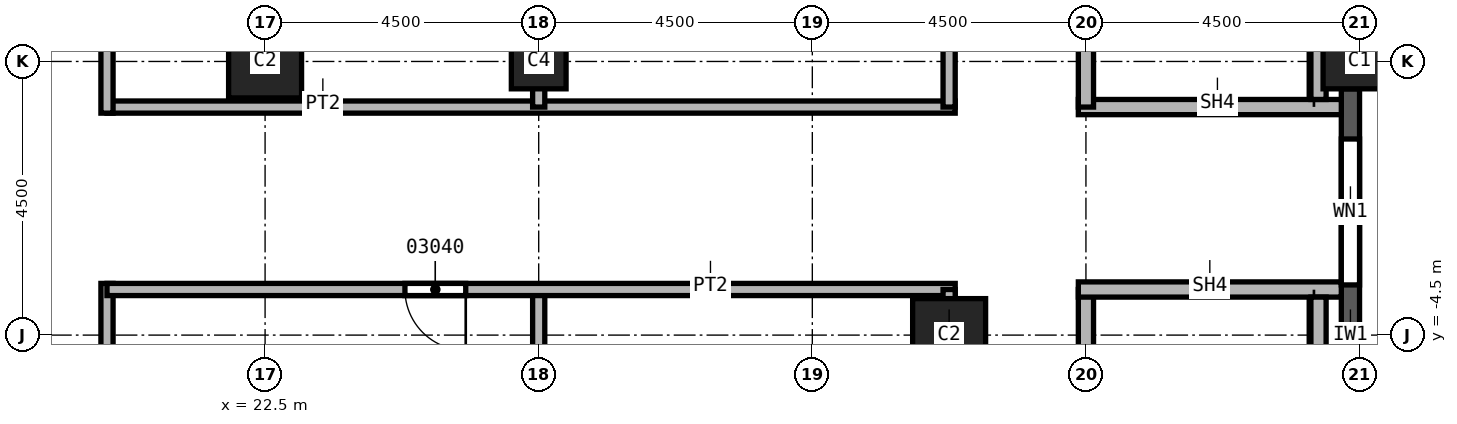
"""IFC4 building model, lengths in metres.
Left out: names, types, materials, properties, quantities, classifications, styles, units other than length and angle.
Written with IfcOpenShell. Run it as: python <this file> out.ifc"""

import sys

from ifc_helpers import new_model, si_unit, direction, frame, frame_2d, origin, origin_2d, place, context, subcontext, project, spatial, rectangle, extrude, element, fill, save


model = new_model("IFC4")
c1 = context("Model", 3, precision=1e-05, world=origin(), true_north=direction((0.0, 1.0)))
c2 = subcontext(c1, "Body", "Model", "MODEL_VIEW")
j1 = project(units=[si_unit("LENGTHUNIT", "METRE"), si_unit("PLANEANGLEUNIT", "RADIAN")], contexts=[c1])
p1 = place(None, origin())
s1 = spatial("IfcSite", under=j1, at=p1, CompositionType="ELEMENT")
p2 = place(p1, origin())
s2 = spatial("IfcBuilding", under=s1, at=p2, CompositionType="ELEMENT")
p3 = place(p2, frame((0.0, 0.0, 92.0)))
s3 = spatial("IfcBuildingStorey", under=s2, at=p3, CompositionType="ELEMENT", Elevation=92.0)
p4 = place(p3, frame((40.5, 0.0, 0.0), z_axis=(0.0, 0.0, 1.0), x_axis=(0.0, 1.0, 0.0)))
e1 = element("IfcColumn", 1, at=p4, inside=s3, PredefinedType="COLUMN", context=c2, shape_type="SweptSolid", body=[
    extrude(rectangle(XDim=0.9, YDim=1.2, at=origin_2d()), origin(), (0.0, 0.0, 1.0), 3.7),
])
for number, where, z_axis, x_axis in (
    (2, (33.75, -4.5, 0.0), (0.0, 0.0, 1.0), (1.0, 0.0, 0.0)),
    (3, (22.5, 0.0, 0.0), (0.0, 0.0, 1.0), (1.0, 0.0, 0.0)),
):
    element("IfcColumn", number, at=place(p3, frame(where, z_axis=z_axis, x_axis=x_axis)), inside=s3, PredefinedType="COLUMN", context=c2, shape_type="SweptSolid", body=[
        extrude(rectangle(XDim=1.2, YDim=1.2, at=origin_2d()), origin(), (0.0, 0.0, 1.0), 3.7),
    ])
p5 = place(p3, frame((27.0, 0.0, 0.0), z_axis=(0.0, 0.0, 1.0), x_axis=(1.0, 0.0, 0.0)))
e4 = element("IfcColumn", 4, at=p5, inside=s3, PredefinedType="COLUMN", context=c2, shape_type="SweptSolid", body=[
    extrude(rectangle(XDim=0.9, YDim=0.9, at=origin_2d()), origin(), (0.0, 0.0, 1.0), 3.7),
])
p6 = place(p3, frame((40.35, -8.55, 0.0), z_axis=(0.0, 0.0, 1.0), x_axis=(0.0, 1.0, 0.0)))
e5 = element("IfcWall", 5, at=p6, inside=s3, PredefinedType="SOLIDWALL", context=c2, shape_type="SweptSolid", body=[
    extrude(rectangle(XDim=8.1, YDim=0.3, at=frame_2d((4.05, 0.0))), origin(), (0.0, 0.0, 1.0), 3.1),
])
p7 = place(p6, frame((0.825, 0.0, 0.8)))
e6 = element("IfcOpeningElement", 6, at=p7, cuts=e5, PredefinedType="OPENING", context=c2, shape_type="SweptSolid", body=[
    extrude(rectangle(XDim=2.4, YDim=1.95, at=frame_2d((1.2, 0.975))), frame((0.0, 0.15, 0.0), z_axis=(0.0, -1.0, 0.0), x_axis=(1.0, 0.0, 0.0)), (0.0, 0.0, 1.0), 0.3),
])
p8 = place(p6, frame((4.875, 0.0, 0.8)))
e7 = element("IfcOpeningElement", 7, at=p8, cuts=e5, PredefinedType="OPENING", context=c2, shape_type="SweptSolid", body=[
    extrude(rectangle(XDim=2.4, YDim=1.95, at=frame_2d((1.2, 0.975))), frame((0.0, 0.15, 0.0), z_axis=(0.0, -1.0, 0.0), x_axis=(1.0, 0.0, 0.0)), (0.0, 0.0, 1.0), 0.3),
])
p9 = place(p3, frame((19.9, -3.65, 0.0), z_axis=(0.0, 0.0, 1.0), x_axis=(0.0, -1.0, 0.0)))
e8 = element("IfcWall", 8, at=p9, inside=s3, PredefinedType="PARTITIONING", context=c2, shape_type="SweptSolid", body=[
    extrude(rectangle(XDim=20.85, YDim=0.2, at=frame_2d((10.425, 0.0))), origin(), (0.0, 0.0, 1.0), 3.7),
])
p10 = place(p9, frame((17.05, 0.0, 0.0)))
e9 = element("IfcOpeningElement", 9, at=p10, cuts=e8, PredefinedType="OPENING", context=c2, shape_type="SweptSolid", body=[
    extrude(rectangle(XDim=1.0, YDim=2.1, at=frame_2d((0.5, 1.05))), frame((0.0, 0.1, 0.0), z_axis=(0.0, -1.0, 0.0), x_axis=(1.0, 0.0, 0.0)), (0.0, 0.0, 1.0), 0.2),
])
p11 = place(p9, frame((7.3, 0.0, 0.0)))
e10 = element("IfcOpeningElement", 10, at=p11, cuts=e8, PredefinedType="OPENING", context=c2, shape_type="SweptSolid", body=[
    extrude(rectangle(XDim=1.0, YDim=2.1, at=frame_2d((0.5, 1.05))), frame((0.0, 0.1, 0.0), z_axis=(0.0, -1.0, 0.0), x_axis=(1.0, 0.0, 0.0)), (0.0, 0.0, 1.0), 0.2),
])
p12 = place(p3, frame((19.9, -0.75, 0.0), z_axis=(0.0, 0.0, 1.0), x_axis=(1.0, 0.0, 0.0)))
e11 = element("IfcWall", 11, at=p12, inside=s3, PredefinedType="PARTITIONING", context=c2, shape_type="SweptSolid", body=[
    extrude(rectangle(XDim=13.95, YDim=0.2, at=frame_2d((6.975, 0.0))), origin(), (0.0, 0.0, 1.0), 3.7),
])
p13 = place(p3, frame((19.9, 24.5, 0.0), z_axis=(0.0, 0.0, 1.0), x_axis=(0.0, -1.0, 0.0)))
e12 = element("IfcWall", 12, at=p13, inside=s3, PredefinedType="PARTITIONING", context=c2, shape_type="SweptSolid", body=[
    extrude(rectangle(XDim=25.35, YDim=0.2, at=frame_2d((12.675, 0.0))), origin(), (0.0, 0.0, 1.0), 3.7),
])
p14 = place(p13, frame((17.15, 0.0, 0.0)))
e13 = element("IfcOpeningElement", 13, at=p14, cuts=e12, PredefinedType="OPENING", context=c2, shape_type="SweptSolid", body=[
    extrude(rectangle(XDim=1.0, YDim=2.1, at=frame_2d((0.5, 1.05))), frame((0.0, 0.1, 0.0), z_axis=(0.0, -1.0, 0.0), x_axis=(1.0, 0.0, 0.0)), (0.0, 0.0, 1.0), 0.2),
])
p15 = place(p13, frame((14.3, 0.0, 0.0)))
e14 = element("IfcOpeningElement", 14, at=p15, cuts=e12, PredefinedType="OPENING", context=c2, shape_type="SweptSolid", body=[
    extrude(rectangle(XDim=1.0, YDim=2.1, at=frame_2d((0.5, 1.05))), frame((0.0, 0.1, 0.0), z_axis=(0.0, -1.0, 0.0), x_axis=(1.0, 0.0, 0.0)), (0.0, 0.0, 1.0), 0.2),
])
p16 = place(p13, frame((9.8, 0.0, 0.0)))
e15 = element("IfcOpeningElement", 15, at=p16, cuts=e12, PredefinedType="OPENING", context=c2, shape_type="SweptSolid", body=[
    extrude(rectangle(XDim=1.0, YDim=2.1, at=frame_2d((0.5, 1.05))), frame((0.0, 0.1, 0.0), z_axis=(0.0, -1.0, 0.0), x_axis=(1.0, 0.0, 0.0)), (0.0, 0.0, 1.0), 0.2),
])
p17 = place(p13, frame((3.7, 0.0, 0.0)))
e16 = element("IfcOpeningElement", 16, at=p17, cuts=e12, PredefinedType="OPENING", context=c2, shape_type="SweptSolid", body=[
    extrude(rectangle(XDim=1.0, YDim=2.1, at=frame_2d((0.5, 1.05))), frame((0.0, 0.1, 0.0), z_axis=(0.0, -1.0, 0.0), x_axis=(1.0, 0.0, 0.0)), (0.0, 0.0, 1.0), 0.2),
])
p18 = place(p3, frame((27.0, -3.75, 0.0), z_axis=(0.0, 0.0, 1.0), x_axis=(0.0, -1.0, 0.0)))
e17 = element("IfcWall", 17, at=p18, inside=s3, PredefinedType="PARTITIONING", context=c2, shape_type="SweptSolid", body=[
    extrude(rectangle(XDim=13.65, YDim=0.2, at=frame_2d((6.825, 0.0))), origin(), (0.0, 0.0, 1.0), 3.7),
])
p19 = place(p3, frame((27.0, 17.4, 0.0), z_axis=(0.0, 0.0, 1.0), x_axis=(0.0, -1.0, 0.0)))
e18 = element("IfcWall", 18, at=p19, inside=s3, PredefinedType="PARTITIONING", context=c2, shape_type="SweptSolid", body=[
    extrude(rectangle(XDim=18.15, YDim=0.2, at=frame_2d((9.075, 0.0))), origin(), (0.0, 0.0, 1.0), 3.7),
])
p20 = place(p3, frame((33.85, -3.75, 0.0), z_axis=(0.0, 0.0, 1.0), x_axis=(-1.0, 0.0, 0.0)))
e19 = element("IfcWall", 19, at=p20, inside=s3, PredefinedType="PARTITIONING", context=c2, shape_type="SweptSolid", body=[
    extrude(rectangle(XDim=13.95, YDim=0.2, at=frame_2d((6.975, 0.0))), origin(), (0.0, 0.0, 1.0), 3.7),
])
p21 = place(p20, frame((8.05, 0.0, 0.0)))
e20 = element("IfcOpeningElement", 20, at=p21, cuts=e19, PredefinedType="OPENING", context=c2, shape_type="SweptSolid", body=[
    extrude(rectangle(XDim=1.0, YDim=2.1, at=frame_2d((0.5, 1.05))), frame((0.0, 0.1, 0.0), z_axis=(0.0, -1.0, 0.0), x_axis=(1.0, 0.0, 0.0)), (0.0, 0.0, 1.0), 0.2),
])
p22 = place(p3, frame((33.75, -11.25, 0.0), z_axis=(0.0, 0.0, 1.0), x_axis=(0.0, 1.0, 0.0)))
e21 = element("IfcWall", 21, at=p22, inside=s3, PredefinedType="PARTITIONING", context=c2, shape_type="SweptSolid", body=[
    extrude(rectangle(XDim=7.5, YDim=0.2, at=frame_2d((3.75, 0.0))), origin(), (0.0, 0.0, 1.0), 3.7),
])
p23 = place(p22, frame((1.45, 0.0, 0.0)))
e22 = element("IfcOpeningElement", 22, at=p23, cuts=e21, PredefinedType="OPENING", context=c2, shape_type="SweptSolid", body=[
    extrude(rectangle(XDim=1.0, YDim=2.1, at=frame_2d((0.5, 1.05))), frame((0.0, 0.1, 0.0), z_axis=(0.0, -1.0, 0.0), x_axis=(1.0, 0.0, 0.0)), (0.0, 0.0, 1.0), 0.2),
])
p24 = place(p3, frame((33.75, -0.75, 0.0), z_axis=(0.0, 0.0, 1.0), x_axis=(0.0, 1.0, 0.0)))
e23 = element("IfcWall", 23, at=p24, inside=s3, PredefinedType="PARTITIONING", context=c2, shape_type="SweptSolid", body=[
    extrude(rectangle(XDim=18.45, YDim=0.2, at=frame_2d((9.225, 0.0))), origin(), (0.0, 0.0, 1.0), 3.7),
])
p25 = place(p24, frame((3.25, 0.0, 0.0)))
e24 = element("IfcOpeningElement", 24, at=p25, cuts=e23, PredefinedType="OPENING", context=c2, shape_type="SweptSolid", body=[
    extrude(rectangle(XDim=1.0, YDim=2.1, at=frame_2d((0.5, 1.05))), frame((0.0, 0.1, 0.0), z_axis=(0.0, -1.0, 0.0), x_axis=(1.0, 0.0, 0.0)), (0.0, 0.0, 1.0), 0.2),
])
p26 = place(p3, frame((35.875, -0.75, 0.0), z_axis=(0.0, 0.0, 1.0), x_axis=(1.0, 0.0, 0.0)))
e25 = element("IfcWall", 25, at=p26, inside=s3, PredefinedType="SOLIDWALL", context=c2, shape_type="SweptSolid", body=[
    extrude(rectangle(XDim=4.325, YDim=0.25, at=frame_2d((2.163, 0.0))), origin(), (0.0, 0.0, 1.0), 3.7),
])
p27 = place(p3, frame((36.0, -11.375, 0.0), z_axis=(0.0, 0.0, 1.0), x_axis=(0.0, 1.0, 0.0)))
e26 = element("IfcWall", 26, at=p27, inside=s3, PredefinedType="SOLIDWALL", context=c2, shape_type="SweptSolid", body=[
    extrude(rectangle(XDim=7.625, YDim=0.25, at=frame_2d((3.812, 0.0))), origin(), (0.0, 0.0, 1.0), 3.7),
])
p28 = place(p27, frame((0.4, 0.0, 0.0)))
e27 = element("IfcOpeningElement", 27, at=p28, cuts=e26, PredefinedType="OPENING", context=c2, shape_type="SweptSolid", body=[
    extrude(rectangle(XDim=1.2, YDim=2.1, at=frame_2d((0.6, 1.05))), frame((0.0, 0.125, 0.0), z_axis=(0.0, -1.0, 0.0), x_axis=(1.0, 0.0, 0.0)), (0.0, 0.0, 1.0), 0.25),
])
p29 = place(p3, frame((36.0, -0.75, 0.0), z_axis=(0.0, 0.0, 1.0), x_axis=(0.0, 1.0, 0.0)))
e28 = element("IfcWall", 28, at=p29, inside=s3, PredefinedType="SOLIDWALL", context=c2, shape_type="SweptSolid", body=[
    extrude(rectangle(XDim=7.625, YDim=0.25, at=frame_2d((3.812, 0.0))), origin(), (0.0, 0.0, 1.0), 3.7),
])
p30 = place(p29, frame((5.95, 0.0, 0.0)))
e29 = element("IfcOpeningElement", 29, at=p30, cuts=e28, PredefinedType="OPENING", context=c2, shape_type="SweptSolid", body=[
    extrude(rectangle(XDim=1.2, YDim=2.1, at=frame_2d((0.6, 1.05))), frame((0.0, 0.125, 0.0), z_axis=(0.0, -1.0, 0.0), x_axis=(1.0, 0.0, 0.0)), (0.0, 0.0, 1.0), 0.25),
])
p31 = place(p3, frame((40.2, -3.75, 0.0), z_axis=(0.0, 0.0, 1.0), x_axis=(-1.0, 0.0, 0.0)))
e30 = element("IfcWall", 30, at=p31, inside=s3, PredefinedType="SOLIDWALL", context=c2, shape_type="SweptSolid", body=[
    extrude(rectangle(XDim=4.325, YDim=0.25, at=frame_2d((2.163, 0.0))), origin(), (0.0, 0.0, 1.0), 3.7),
])
for number, where, z_axis, x_axis in (
    (31, (39.825, -11.125, 0.0), (0.0, 0.0, 1.0), (0.0, 1.0, 0.0)),
    (32, (39.825, -0.625, 0.0), (0.0, 0.0, 1.0), (0.0, 1.0, 0.0)),
):
    element("IfcWall", number, at=place(p3, frame(where, z_axis=z_axis, x_axis=x_axis)), inside=s3, PredefinedType="SOLIDWALL", context=c2, shape_type="SweptSolid", body=[
        extrude(rectangle(XDim=7.25, YDim=0.25, at=frame_2d((3.625, 0.0))), origin(), (0.0, 0.0, 1.0), 3.7),
    ])
p32 = place(p8, origin())
e33 = element("IfcWindow", 33, at=p32, inside=s3, PartitioningType="SINGLE_PANEL", PredefinedType="WINDOW", context=c2, shape_type="SweptSolid", body=[
    extrude(rectangle(XDim=2.4, YDim=1.95, at=frame_2d((1.2, 0.975))), frame((0.0, 0.03, 0.0), z_axis=(0.0, -1.0, 0.0), x_axis=(1.0, 0.0, 0.0)), (0.0, 0.0, 1.0), 0.06),
])
fill(e7, e33)
p33 = place(p21, origin())
e34 = element("IfcDoor", 34, at=p33, inside=s3, OperationType="SINGLE_SWING_LEFT", PredefinedType="DOOR", context=c2, shape_type="SweptSolid", body=[
    extrude(rectangle(XDim=1.0, YDim=2.1, at=frame_2d((0.5, 1.05))), frame((0.0, 0.025, 0.0), z_axis=(0.0, -1.0, 0.0), x_axis=(1.0, 0.0, 0.0)), (0.0, 0.0, 1.0), 0.05),
])
fill(e20, e34)
save(model, sys.argv[1])
